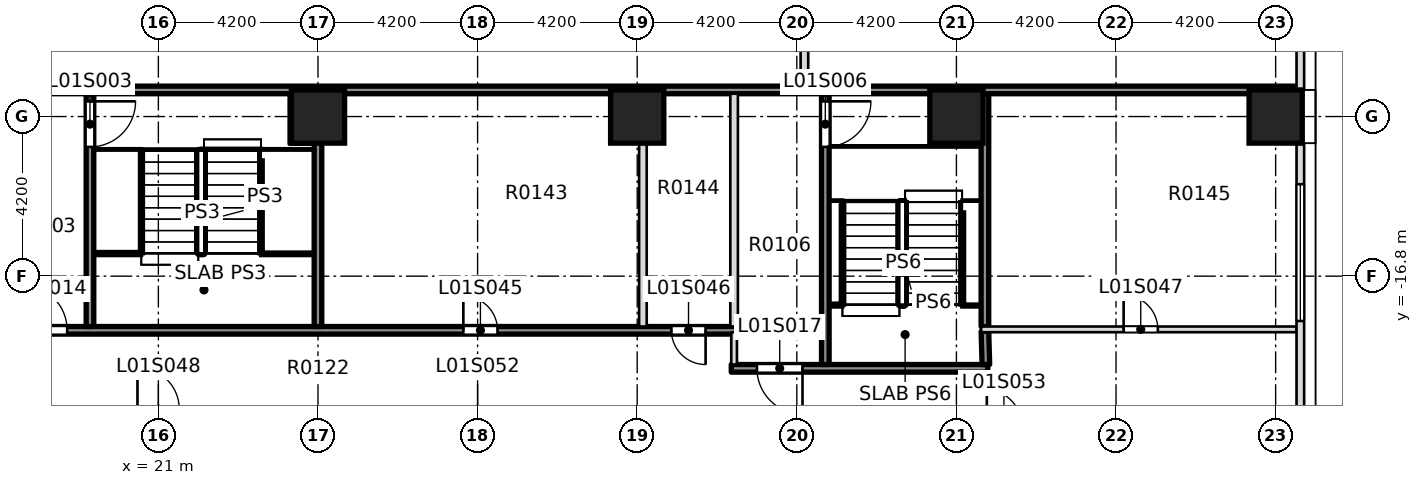
"""IFC4 building model, lengths in metres.
Left out: names, types, materials, properties, quantities, classifications, styles, units other than length and angle.
Written with IfcOpenShell. Run it as: python <this file> out.ifc"""

import sys

from ifc_helpers import new_model, si_unit, direction, frame, frame_2d, origin, origin_2d, place, context, subcontext, project, spatial, rectangle, extrude, element, fill, save


model = new_model("IFC4")
c1 = context("Model", 3, precision=1e-05, world=origin(), true_north=direction((0.0, 1.0)))
c2 = subcontext(c1, "Body", "Model", "MODEL_VIEW")
j1 = project(units=[si_unit("LENGTHUNIT", "METRE"), si_unit("PLANEANGLEUNIT", "RADIAN")], contexts=[c1])
p1 = place(None, origin())
s1 = spatial("IfcSite", under=j1, at=p1, CompositionType="ELEMENT")
p2 = place(p1, origin())
s2 = spatial("IfcBuilding", under=s1, at=p2, CompositionType="ELEMENT")
p3 = place(p2, frame((0.0, 0.0, 7.5)))
s3 = spatial("IfcBuildingStorey", under=s2, at=p3, CompositionType="ELEMENT", Elevation=7.5)
p4 = place(p3, frame((25.2, -12.6, -0.4), z_axis=(0.0, 0.0, 1.0), x_axis=(1.0, 0.0, 0.0)))
e1 = element("IfcColumn", 1, at=p4, inside=s3, PredefinedType="COLUMN", context=c2, shape_type="SweptSolid", body=[
    extrude(rectangle(XDim=1.4, YDim=1.4, at=origin_2d()), origin(), (0.0, 0.0, 1.0), 5.0),
])
for number, where, z_axis, x_axis in (
    (2, (33.6, -12.6, 0.0), (0.0, 0.0, 1.0), (1.0, 0.0, 0.0)),
    (3, (42.0, -12.6, 0.0), (0.0, 0.0, 1.0), (1.0, 0.0, 0.0)),
):
    element("IfcColumn", number, at=place(p3, frame(where, z_axis=z_axis, x_axis=x_axis)), inside=s3, PredefinedType="COLUMN", context=c2, shape_type="SweptSolid", body=[
        extrude(rectangle(XDim=1.4, YDim=1.4, at=origin_2d()), origin(), (0.0, 0.0, 1.0), 4.6),
    ])
p5 = place(p3, frame((50.4, -12.6, 0.0), z_axis=(0.0, 0.0, 1.0), x_axis=(1.0, 0.0, 0.0)))
e4 = element("IfcColumn", 4, at=p5, inside=s3, PredefinedType="COLUMN", context=c2, shape_type="SweptSolid", body=[
    extrude(rectangle(XDim=1.4, YDim=1.4, at=origin_2d()), origin(), (0.0, 0.0, 1.0), 5.0),
])
p6 = place(p3, frame((36.075, -19.225, 0.0), z_axis=(0.0, 0.0, 1.0), x_axis=(1.0, 0.0, 0.0)))
e5 = element("IfcWall", 5, at=p6, inside=s3, PredefinedType="SOLIDWALL", context=c2, shape_type="SweptSolid", body=[
    extrude(rectangle(XDim=6.75, YDim=0.2, at=frame_2d((3.375, 0.0))), origin(), (0.0, 0.0, 1.0), 4.6),
])
p7 = place(p6, frame((0.675, 0.0, 0.0)))
e6 = element("IfcOpeningElement", 6, at=p7, cuts=e5, PredefinedType="OPENING", context=c2, shape_type="SweptSolid", body=[
    extrude(rectangle(XDim=1.2, YDim=2.1, at=frame_2d((0.6, 1.05))), frame((0.0, 0.11, 0.0), z_axis=(0.0, -1.0, 0.0), x_axis=(1.0, 0.0, 0.0)), (0.0, 0.0, 1.0), 0.22),
])
p8 = place(p3, frame((12.25, -18.225, 0.0), z_axis=(0.0, 0.0, 1.0), x_axis=(1.0, 0.0, 0.0)))
e7 = element("IfcWall", 7, at=p8, inside=s3, PredefinedType="SOLIDWALL", context=c2, shape_type="SweptSolid", body=[
    extrude(rectangle(XDim=24.0, YDim=0.2, at=frame_2d((12.0, 0.0))), origin(), (0.0, 0.0, 1.0), 4.6),
])
p9 = place(p8, frame((5.15, 0.0, 0.0)))
e8 = element("IfcOpeningElement", 8, at=p9, cuts=e7, PredefinedType="OPENING", context=c2, shape_type="SweptSolid", body=[
    extrude(rectangle(XDim=1.2, YDim=2.1, at=frame_2d((0.6, 1.05))), frame((0.0, 0.11, 0.0), z_axis=(0.0, -1.0, 0.0), x_axis=(1.0, 0.0, 0.0)), (0.0, 0.0, 1.0), 0.22),
])
p10 = place(p8, frame((16.775, 0.0, 0.0)))
e9 = element("IfcOpeningElement", 9, at=p10, cuts=e7, PredefinedType="OPENING", context=c2, shape_type="SweptSolid", body=[
    extrude(rectangle(XDim=0.9, YDim=2.1, at=frame_2d((0.45, 1.05))), frame((0.0, 0.11, 0.0), z_axis=(0.0, -1.0, 0.0), x_axis=(1.0, 0.0, 0.0)), (0.0, 0.0, 1.0), 0.22),
])
p11 = place(p8, frame((22.25, 0.0, 0.0)))
e10 = element("IfcOpeningElement", 10, at=p11, cuts=e7, PredefinedType="OPENING", context=c2, shape_type="SweptSolid", body=[
    extrude(rectangle(XDim=0.9, YDim=2.1, at=frame_2d((0.45, 1.05))), frame((0.0, 0.11, 0.0), z_axis=(0.0, -1.0, 0.0), x_axis=(1.0, 0.0, 0.0)), (0.0, 0.0, 1.0), 0.22),
])
p12 = place(p8, frame((1.825, 0.0, 0.0)))
e11 = element("IfcOpeningElement", 11, at=p12, cuts=e7, PredefinedType="OPENING", context=c2, shape_type="SweptSolid", body=[
    extrude(rectangle(XDim=0.7, YDim=2.1, at=frame_2d((0.35, 1.05))), frame((0.0, 0.11, 0.0), z_axis=(0.0, -1.0, 0.0), x_axis=(1.0, 0.0, 0.0)), (0.0, 0.0, 1.0), 0.22),
])
p13 = place(p3, frame((42.65, -18.2, 0.0), z_axis=(0.0, 0.0, 1.0), x_axis=(1.0, 0.0, 0.0)))
e12 = element("IfcWall", 12, at=p13, inside=s3, PredefinedType="PARTITIONING", context=c2, shape_type="SweptSolid", body=[
    extrude(rectangle(XDim=8.3, YDim=0.15, at=frame_2d((4.15, 0.0))), origin(), (0.0, 0.0, 1.0), 4.6),
])
p14 = place(p13, frame((3.75, 0.0, 0.0)))
e13 = element("IfcOpeningElement", 13, at=p14, cuts=e12, PredefinedType="OPENING", context=c2, shape_type="SweptSolid", body=[
    extrude(rectangle(XDim=0.9, YDim=2.1, at=frame_2d((0.45, 1.05))), frame((0.0, 0.085, 0.0), z_axis=(0.0, -1.0, 0.0), x_axis=(1.0, 0.0, 0.0)), (0.0, 0.0, 1.0), 0.17),
])
p15 = place(p3, frame((19.2, -18.125, 0.0), z_axis=(0.0, 0.0, 1.0), x_axis=(0.0, 1.0, 0.0)))
e14 = element("IfcWall", 14, at=p15, inside=s3, PredefinedType="SOLIDWALL", context=c2, shape_type="SweptSolid", body=[
    extrude(rectangle(XDim=6.125, YDim=0.2, at=frame_2d((3.062, 0.0))), origin(), (0.0, 0.0, 1.0), 4.6),
])
p16 = place(p15, frame((4.725, 0.0, 0.0)))
e15 = element("IfcOpeningElement", 15, at=p16, cuts=e14, PredefinedType="OPENING", context=c2, shape_type="SweptSolid", body=[
    extrude(rectangle(XDim=1.2, YDim=2.1, at=frame_2d((0.6, 1.05))), frame((0.0, 0.11, 0.0), z_axis=(0.0, -1.0, 0.0), x_axis=(1.0, 0.0, 0.0)), (0.0, 0.0, 1.0), 0.22),
])
p17 = place(p3, frame((25.2, -18.125, 0.0), z_axis=(0.0, 0.0, 1.0), x_axis=(0.0, 1.0, 0.0)))
e16 = element("IfcWall", 16, at=p17, inside=s3, PredefinedType="SOLIDWALL", context=c2, shape_type="SweptSolid", body=[
    extrude(rectangle(XDim=6.125, YDim=0.2, at=frame_2d((3.062, 0.0))), origin(), (0.0, 0.0, 1.0), 4.6),
])
p18 = place(p3, frame((33.75, -18.125, 0.0), z_axis=(0.0, 0.0, 1.0), x_axis=(0.0, 1.0, 0.0)))
e17 = element("IfcWall", 17, at=p18, inside=s3, PredefinedType="PARTITIONING", context=c2, shape_type="SweptSolid", body=[
    extrude(rectangle(XDim=6.125, YDim=0.2, at=frame_2d((3.062, 0.0))), origin(), (0.0, 0.0, 1.0), 4.6),
])
p19 = place(p3, frame((36.15, -19.125, 0.0), z_axis=(0.0, 0.0, 1.0), x_axis=(0.0, 1.0, 0.0)))
e18 = element("IfcWall", 18, at=p19, inside=s3, PredefinedType="PARTITIONING", context=c2, shape_type="SweptSolid", body=[
    extrude(rectangle(XDim=0.85, YDim=0.15, at=frame_2d((0.425, 0.0))), origin(), (0.0, 0.0, 1.0), 4.6),
])
p20 = place(p3, frame((36.15, -18.125, 0.0), z_axis=(0.0, 0.0, 1.0), x_axis=(0.0, 1.0, 0.0)))
e19 = element("IfcWall", 19, at=p20, inside=s3, PredefinedType="PARTITIONING", context=c2, shape_type="SweptSolid", body=[
    extrude(rectangle(XDim=6.125, YDim=0.2, at=frame_2d((3.062, 0.0))), origin(), (0.0, 0.0, 1.0), 4.6),
])
p21 = place(p3, frame((38.0, -11.8, 0.0), z_axis=(0.0, 0.0, 1.0), x_axis=(0.0, 1.0, 0.0)))
e20 = element("IfcWall", 20, at=p21, inside=s3, PredefinedType="PARTITIONING", context=c2, shape_type="SweptSolid", body=[
    extrude(rectangle(XDim=24.3, YDim=0.2, at=frame_2d((12.15, 0.0))), origin(), (0.0, 0.0, 1.0), 4.6),
])
p22 = place(p21, frame((11.7, 0.0, 0.0)))
e21 = element("IfcOpeningElement", 21, at=p22, cuts=e20, PredefinedType="OPENING", context=c2, shape_type="SweptSolid", body=[
    extrude(rectangle(XDim=0.9, YDim=2.1, at=frame_2d((0.45, 1.05))), frame((0.0, 0.11, 0.0), z_axis=(0.0, -1.0, 0.0), x_axis=(1.0, 0.0, 0.0)), (0.0, 0.0, 1.0), 0.22),
])
p23 = place(p21, frame((12.75, 0.0, 0.0)))
e22 = element("IfcOpeningElement", 22, at=p23, cuts=e20, PredefinedType="OPENING", context=c2, shape_type="SweptSolid", body=[
    extrude(rectangle(XDim=0.9, YDim=2.1, at=frame_2d((0.45, 1.05))), frame((0.0, 0.11, 0.0), z_axis=(0.0, -1.0, 0.0), x_axis=(1.0, 0.0, 0.0)), (0.0, 0.0, 1.0), 0.22),
])
p24 = place(p3, frame((38.55, -19.125, 0.0), z_axis=(0.0, 0.0, 1.0), x_axis=(0.0, 1.0, 0.0)))
e23 = element("IfcWall", 23, at=p24, inside=s3, PredefinedType="SOLIDWALL", context=c2, shape_type="SweptSolid", body=[
    extrude(rectangle(XDim=7.125, YDim=0.2, at=frame_2d((3.562, 0.0))), origin(), (0.0, 0.0, 1.0), 4.6),
])
p25 = place(p24, frame((5.725, 0.0, 0.0)))
e24 = element("IfcOpeningElement", 24, at=p25, cuts=e23, PredefinedType="OPENING", context=c2, shape_type="SweptSolid", body=[
    extrude(rectangle(XDim=1.2, YDim=2.1, at=frame_2d((0.6, 1.05))), frame((0.0, 0.11, 0.0), z_axis=(0.0, -1.0, 0.0), x_axis=(1.0, 0.0, 0.0)), (0.0, 0.0, 1.0), 0.22),
])
p26 = place(p3, frame((42.775, -19.125, 0.0), z_axis=(0.0, 0.0, 1.0), x_axis=(-0.028448302746, 0.99959526513, 0.0)))
e25 = element("IfcWall", 25, at=p26, inside=s3, PredefinedType="SOLIDWALL", context=c2, shape_type="SweptSolid", body=[
    extrude(rectangle(XDim=0.875, YDim=0.2, at=frame_2d((0.438, 0.0))), origin(), (0.0, 0.0, 1.0), 4.6),
])
p27 = place(p3, frame((42.75, -18.125, 0.0), z_axis=(0.0, 0.0, 1.0), x_axis=(0.0, 1.0, 0.0)))
e26 = element("IfcWall", 26, at=p27, inside=s3, PredefinedType="SOLIDWALL", context=c2, shape_type="SweptSolid", body=[
    extrude(rectangle(XDim=6.125, YDim=0.2, at=frame_2d((3.062, 0.0))), origin(), (0.0, 0.0, 1.0), 4.6),
])
p28 = place(p3, frame((51.05, -20.3, 0.0), z_axis=(0.0, 0.0, 1.0), x_axis=(0.0, 1.0, 0.0)))
e27 = element("IfcWall", 27, at=p28, inside=s3, PredefinedType="STANDARD", context=c2, shape_type="SweptSolid", body=[
    extrude(rectangle(XDim=7.0, YDim=0.2, at=frame_2d((3.5, 0.0))), origin(), (0.0, 0.0, 1.0), 4.6),
])
p29 = place(p28, frame((2.32, 0.0, 0.9)))
e28 = element("IfcOpeningElement", 28, at=p29, cuts=e27, PredefinedType="OPENING", context=c2, shape_type="SweptSolid", body=[
    extrude(rectangle(XDim=3.6, YDim=2.8, at=frame_2d((1.8, 1.4))), frame((0.0, 0.11, 0.0), z_axis=(0.0, -1.0, 0.0), x_axis=(1.0, 0.0, 0.0)), (0.0, 0.0, 1.0), 0.22),
])
p30 = place(p3, frame((51.05, -11.9, 0.0), z_axis=(0.0, 0.0, 1.0), x_axis=(0.0, 1.0, 0.0)))
e29 = element("IfcWall", 29, at=p30, inside=s3, PredefinedType="STANDARD", context=c2, shape_type="SweptSolid", body=[
    extrude(rectangle(XDim=7.0, YDim=0.2, at=frame_2d((3.5, 0.0))), origin(), (0.0, 0.0, 1.0), 4.6),
])
p31 = place(p30, frame((1.7, 0.0, 0.9)))
e30 = element("IfcOpeningElement", 30, at=p31, cuts=e29, PredefinedType="OPENING", context=c2, shape_type="SweptSolid", body=[
    extrude(rectangle(XDim=3.6, YDim=2.8, at=frame_2d((1.8, 1.4))), frame((0.0, 0.11, 0.0), z_axis=(0.0, -1.0, 0.0), x_axis=(1.0, 0.0, 0.0)), (0.0, 0.0, 1.0), 0.22),
])
p32 = place(p3, frame((16.875, -11.9, 0.0), z_axis=(0.0, 0.0, 1.0), x_axis=(1.0, 0.0, 0.0)))
e31 = element("IfcWall", 31, at=p32, inside=s3, PredefinedType="SOLIDWALL", context=c2, shape_type="SweptSolid", body=[
    extrude(rectangle(XDim=34.075, YDim=0.2, at=frame_2d((17.038, 0.0))), origin(), (0.0, 0.0, 1.0), 4.6),
])
p33 = place(p16, origin())
e32 = element("IfcDoor", 32, at=p33, inside=s3, OperationType="DOUBLE_DOOR_SINGLE_SWING", PredefinedType="DOOR", context=c2, shape_type="SweptSolid", body=[
    extrude(rectangle(XDim=1.2, YDim=2.1, at=frame_2d((0.6, 1.05))), frame((0.0, 0.025, 0.0), z_axis=(0.0, -1.0, 0.0), x_axis=(1.0, 0.0, 0.0)), (0.0, 0.0, 1.0), 0.05),
])
fill(e15, e32)
p34 = place(p25, origin())
e33 = element("IfcDoor", 33, at=p34, inside=s3, OperationType="DOUBLE_DOOR_SINGLE_SWING", PredefinedType="DOOR", context=c2, shape_type="SweptSolid", body=[
    extrude(rectangle(XDim=1.2, YDim=2.1, at=frame_2d((0.6, 1.05))), frame((0.0, 0.025, 0.0), z_axis=(0.0, -1.0, 0.0), x_axis=(1.0, 0.0, 0.0)), (0.0, 0.0, 1.0), 0.05),
])
fill(e24, e33)
p35 = place(p9, origin())
e34 = element("IfcDoor", 34, at=p35, inside=s3, OperationType="SINGLE_SWING_LEFT", PredefinedType="DOOR", context=c2, shape_type="SweptSolid", body=[
    extrude(rectangle(XDim=1.2, YDim=2.1, at=frame_2d((0.6, 1.05))), frame((0.0, 0.025, 0.0), z_axis=(0.0, -1.0, 0.0), x_axis=(1.0, 0.0, 0.0)), (0.0, 0.0, 1.0), 0.05),
])
fill(e8, e34)
p36 = place(p7, origin())
e35 = element("IfcDoor", 35, at=p36, inside=s3, OperationType="SINGLE_SWING_LEFT", PredefinedType="DOOR", context=c2, shape_type="SweptSolid", body=[
    extrude(rectangle(XDim=1.2, YDim=2.1, at=frame_2d((0.6, 1.05))), frame((0.0, 0.025, 0.0), z_axis=(0.0, -1.0, 0.0), x_axis=(1.0, 0.0, 0.0)), (0.0, 0.0, 1.0), 0.05),
])
fill(e6, e35)
p37 = place(p10, origin())
e36 = element("IfcDoor", 36, at=p37, inside=s3, OperationType="SINGLE_SWING_RIGHT", PredefinedType="DOOR", context=c2, shape_type="SweptSolid", body=[
    extrude(rectangle(XDim=0.9, YDim=2.1, at=frame_2d((0.45, 1.05))), frame((0.0, 0.025, 0.0), z_axis=(0.0, -1.0, 0.0), x_axis=(1.0, 0.0, 0.0)), (0.0, 0.0, 1.0), 0.05),
])
fill(e9, e36)
p38 = place(p11, origin())
e37 = element("IfcDoor", 37, at=p38, inside=s3, OperationType="SINGLE_SWING_LEFT", PredefinedType="DOOR", context=c2, shape_type="SweptSolid", body=[
    extrude(rectangle(XDim=0.9, YDim=2.1, at=frame_2d((0.45, 1.05))), frame((0.0, 0.025, 0.0), z_axis=(0.0, -1.0, 0.0), x_axis=(1.0, 0.0, 0.0)), (0.0, 0.0, 1.0), 0.05),
])
fill(e10, e37)
p39 = place(p14, origin())
e38 = element("IfcDoor", 38, at=p39, inside=s3, OperationType="SINGLE_SWING_LEFT", PredefinedType="DOOR", context=c2, shape_type="SweptSolid", body=[
    extrude(rectangle(XDim=0.9, YDim=2.1, at=frame_2d((0.45, 1.05))), frame((0.0, 0.025, 0.0), z_axis=(0.0, -1.0, 0.0), x_axis=(1.0, 0.0, 0.0)), (0.0, 0.0, 1.0), 0.05),
])
fill(e13, e38)
p40 = place(p29, origin())
e39 = element("IfcWindow", 39, at=p40, inside=s3, PartitioningType="SINGLE_PANEL", PredefinedType="WINDOW", context=c2, shape_type="SweptSolid", body=[
    extrude(rectangle(XDim=3.6, YDim=2.8, at=frame_2d((1.8, 1.4))), frame((0.0, 0.03, 0.0), z_axis=(0.0, -1.0, 0.0), x_axis=(1.0, 0.0, 0.0)), (0.0, 0.0, 1.0), 0.06),
])
fill(e28, e39)
save(model, sys.argv[1])
